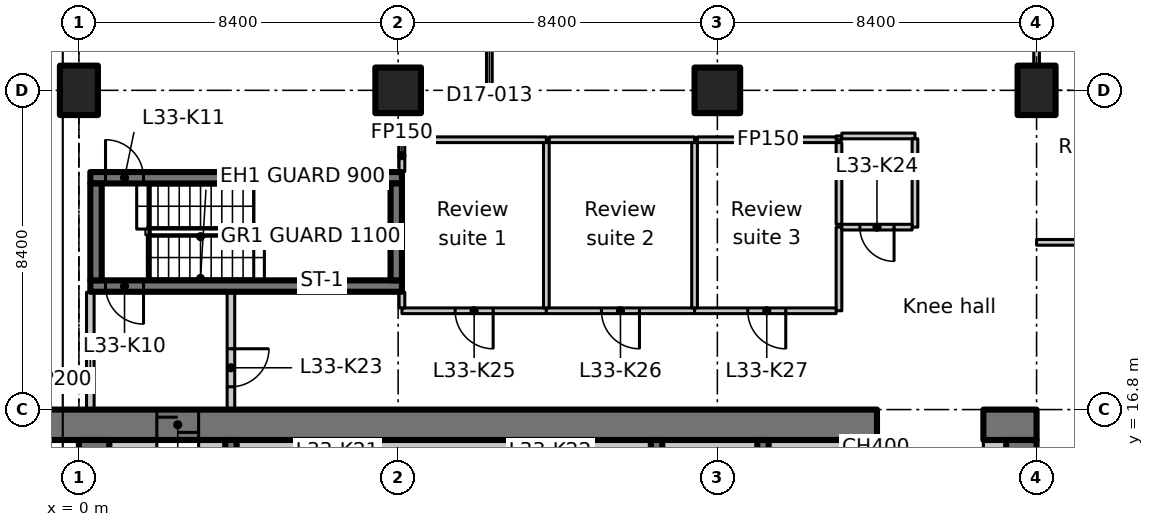
"""IFC4 building model, lengths in metres.
Left out: names, types, materials, properties, quantities, classifications, styles, units other than length and angle.
Written with IfcOpenShell. Run it as: python <this file> out.ifc"""

import sys

from ifc_helpers import new_model, si_unit, direction, frame, frame_2d, origin, origin_2d, place, context, subcontext, project, spatial, polyline, rectangle, outline, extrude, element, fill, save


model = new_model("IFC4")
c1 = context("Model", 3, precision=1e-05, world=origin(), true_north=direction((0.0, 1.0)))
c2 = subcontext(c1, "Body", "Model", "MODEL_VIEW")
j1 = project(units=[si_unit("LENGTHUNIT", "METRE"), si_unit("PLANEANGLEUNIT", "RADIAN")], contexts=[c1])
p1 = place(None, origin())
s1 = spatial("IfcSite", under=j1, at=p1, CompositionType="ELEMENT")
p2 = place(p1, origin())
s2 = spatial("IfcBuilding", under=s1, at=p2, CompositionType="ELEMENT")
p3 = place(p2, frame((0.0, 0.0, 134.9)))
s3 = spatial("IfcBuildingStorey", under=s2, at=p3, CompositionType="ELEMENT", Elevation=134.9)
p4 = place(p3, frame((0.0, 25.2, 0.0), z_axis=(0.0, 0.0, 1.0), x_axis=(1.0, 0.0, 0.0)))
e1 = element("IfcColumn", 1, at=p4, inside=s3, PredefinedType="COLUMN", context=c2, shape_type="SweptSolid", body=[
    extrude(rectangle(XDim=1.0, YDim=1.3, at=origin_2d()), origin(), (0.0, 0.0, 1.0), 3.35),
])
for number, where, z_axis, x_axis in (
    (2, (8.4, 25.2, 0.0), (0.0, 0.0, 1.0), (1.0, 0.0, 0.0)),
    (3, (16.8, 25.2, 0.0), (0.0, 0.0, 1.0), (1.0, 0.0, 0.0)),
):
    element("IfcColumn", number, at=place(p3, frame(where, z_axis=z_axis, x_axis=x_axis)), inside=s3, PredefinedType="COLUMN", context=c2, shape_type="SweptSolid", body=[
        extrude(rectangle(XDim=1.2, YDim=1.2, at=origin_2d()), origin(), (0.0, 0.0, 1.0), 3.35),
    ])
p5 = place(p3, frame((25.2, 25.2, 0.0), z_axis=(0.0, 0.0, 1.0), x_axis=(1.0, 0.0, 0.0)))
e4 = element("IfcColumn", 4, at=p5, inside=s3, PredefinedType="COLUMN", context=c2, shape_type="SweptSolid", body=[
    extrude(rectangle(XDim=1.0, YDim=1.3, at=origin_2d()), origin(), (0.0, 0.0, 1.0), 3.35),
])
p6 = place(p3, frame((-1.1, 16.4, 0.0), z_axis=(0.0, 0.0, 1.0), x_axis=(1.0, 0.0, 0.0)))
e5 = element("IfcWall", 5, at=p6, inside=s3, PredefinedType="SHEAR", context=c2, shape_type="SweptSolid", body=[
    extrude(rectangle(XDim=22.1, YDim=0.8, at=frame_2d((11.05, 0.0))), origin(), (0.0, 0.0, 1.0), 3.35),
])
p7 = place(p6, frame((3.15, 0.0, 0.0)))
e6 = element("IfcOpeningElement", 6, at=p7, cuts=e5, PredefinedType="OPENING", context=c2, shape_type="SweptSolid", body=[
    extrude(rectangle(XDim=1.1, YDim=2.3, at=frame_2d((0.55, 1.15))), frame((0.0, 0.41, 0.0), z_axis=(0.0, -1.0, 0.0), x_axis=(1.0, 0.0, 0.0)), (0.0, 0.0, 1.0), 0.82),
])
p8 = place(p3, frame((23.8, 16.4, 0.0), z_axis=(0.0, 0.0, 1.0), x_axis=(1.0, 0.0, 0.0)))
e7 = element("IfcWall", 7, at=p8, inside=s3, PredefinedType="SHEAR", context=c2, shape_type="SweptSolid", body=[
    extrude(rectangle(XDim=1.4, YDim=0.8, at=frame_2d((0.7, 0.0))), origin(), (0.0, 0.0, 1.0), 3.35),
])
p9 = place(p3, frame((0.4, 7.136, 0.0), z_axis=(0.0, 0.0, 1.0), x_axis=(0.0, 1.0, 0.0)))
e8 = element("IfcWall", 8, at=p9, inside=s3, PredefinedType="SHEAR", context=c2, shape_type="SweptSolid", body=[
    extrude(rectangle(XDim=8.864, YDim=0.8, at=frame_2d((4.432, 0.0))), origin(), (0.0, 0.0, 1.0), 3.35),
])
p10 = place(p3, frame((24.8, 12.6, 0.0), z_axis=(0.0, 0.0, 1.0), x_axis=(0.0, 1.0, 0.0)))
e9 = element("IfcWall", 9, at=p10, inside=s3, PredefinedType="SHEAR", context=c2, shape_type="SweptSolid", body=[
    extrude(rectangle(XDim=3.4, YDim=0.8, at=frame_2d((1.7, 0.0))), origin(), (0.0, 0.0, 1.0), 3.35),
])
p11 = place(p3, frame((0.8, 15.8, 0.0), z_axis=(0.0, 0.0, 1.0), x_axis=(1.0, 0.0, 0.0)))
e10 = element("IfcWall", 10, at=p11, inside=s3, PredefinedType="PARTITIONING", context=c2, shape_type="SweptSolid", body=[
    extrude(rectangle(XDim=1.25, YDim=0.4, at=frame_2d((0.625, 0.0))), origin(), (0.0, 0.0, 1.0), 3.35),
])
p12 = place(p3, frame((23.8, 15.8, 0.0), z_axis=(0.0, 0.0, 1.0), x_axis=(1.0, 0.0, 0.0)))
e11 = element("IfcWall", 11, at=p12, inside=s3, PredefinedType="PARTITIONING", context=c2, shape_type="SweptSolid", body=[
    extrude(rectangle(XDim=0.6, YDim=0.4, at=frame_2d((0.3, 0.0))), origin(), (0.0, 0.0, 1.0), 3.35),
])
for number, where, z_axis, x_axis in (
    (12, (4.0, 12.95, 0.0), (0.0, 0.0, 1.0), (0.0, 1.0, 0.0)),
    (13, (15.2, 12.95, 0.0), (0.0, 0.0, 1.0), (0.0, 1.0, 0.0)),
    (14, (18.0, 12.95, 0.0), (0.0, 0.0, 1.0), (0.0, 1.0, 0.0)),
    (15, (20.8, 12.95, 0.0), (0.0, 0.0, 1.0), (0.0, 1.0, 0.0)),
):
    element("IfcWall", number, at=place(p3, frame(where, z_axis=z_axis, x_axis=x_axis)), inside=s3, PredefinedType="SHEAR", context=c2, shape_type="SweptSolid", body=[
        extrude(rectangle(XDim=3.05, YDim=0.3, at=frame_2d((1.525, 0.0))), origin(), (0.0, 0.0, 1.0), 3.35),
    ])
p13 = place(p3, frame((8.5, 20.05, 0.0), z_axis=(0.0, 0.0, 1.0), x_axis=(-1.0, 0.0, 0.0)))
e16 = element("IfcWall", 16, at=p13, inside=s3, PredefinedType="SHEAR", context=c2, shape_type="SweptSolid", body=[
    extrude(rectangle(XDim=8.2, YDim=0.3, at=frame_2d((4.1, 0.0))), origin(), (0.0, 0.0, 1.0), 3.35),
])
p14 = place(p13, frame((6.8, 0.0, 0.0)))
e17 = element("IfcOpeningElement", 17, at=p14, cuts=e16, PredefinedType="OPENING", context=c2, shape_type="SweptSolid", body=[
    extrude(rectangle(XDim=1.0, YDim=2.1, at=frame_2d((0.5, 1.05))), frame((0.0, 0.16, 0.0), z_axis=(0.0, -1.0, 0.0), x_axis=(1.0, 0.0, 0.0)), (0.0, 0.0, 1.0), 0.32),
])
p15 = place(p3, frame((0.3, 22.9, 0.0), z_axis=(0.0, 0.0, 1.0), x_axis=(1.0, 0.0, 0.0)))
e18 = element("IfcWall", 18, at=p15, inside=s3, PredefinedType="SHEAR", context=c2, shape_type="SweptSolid", body=[
    extrude(rectangle(XDim=8.2, YDim=0.3, at=frame_2d((4.1, 0.0))), origin(), (0.0, 0.0, 1.0), 3.35),
])
p16 = place(p15, frame((0.4, 0.0, 0.0)))
e19 = element("IfcOpeningElement", 19, at=p16, cuts=e18, PredefinedType="OPENING", context=c2, shape_type="SweptSolid", body=[
    extrude(rectangle(XDim=1.0, YDim=2.1, at=frame_2d((0.5, 1.05))), frame((0.0, 0.16, 0.0), z_axis=(0.0, -1.0, 0.0), x_axis=(1.0, 0.0, 0.0)), (0.0, 0.0, 1.0), 0.32),
])
for number, where, z_axis, x_axis in (
    (20, (0.45, 20.2, 0.0), (0.0, 0.0, 1.0), (0.0, 1.0, 0.0)),
    (21, (8.35, 20.2, 0.0), (0.0, 0.0, 1.0), (0.0, 1.0, 0.0)),
):
    element("IfcWall", number, at=place(p3, frame(where, z_axis=z_axis, x_axis=x_axis)), inside=s3, PredefinedType="SHEAR", context=c2, shape_type="SweptSolid", body=[
        extrude(rectangle(XDim=2.55, YDim=0.3, at=frame_2d((1.275, 0.0))), origin(), (0.0, 0.0, 1.0), 3.35),
    ])
p17 = place(p3, frame((0.3, 16.812, 0.0), z_axis=(0.0, 0.0, 1.0), x_axis=(0.0, 1.0, 0.0)))
e22 = element("IfcWall", 22, at=p17, inside=s3, PredefinedType="PARTITIONING", context=c2, shape_type="SweptSolid", body=[
    extrude(rectangle(XDim=3.076, YDim=0.2, at=frame_2d((1.538, 0.0))), origin(), (0.0, 0.0, 1.0), 2.98),
])
p18 = place(p3, frame((4.0, 19.888, 0.0), z_axis=(0.0, 0.0, 1.0), x_axis=(0.0, -1.0, 0.0)))
e23 = element("IfcWall", 23, at=p18, inside=s3, PredefinedType="PARTITIONING", context=c2, shape_type="SweptSolid", body=[
    extrude(rectangle(XDim=3.076, YDim=0.2, at=frame_2d((1.538, 0.0))), origin(), (0.0, 0.0, 1.0), 3.35),
])
p19 = place(p18, frame((1.488, 0.0, 0.0)))
e24 = element("IfcOpeningElement", 24, at=p19, cuts=e23, PredefinedType="OPENING", context=c2, shape_type="SweptSolid", body=[
    extrude(rectangle(XDim=1.0, YDim=2.1, at=frame_2d((0.5, 1.05))), frame((0.0, 0.11, 0.0), z_axis=(0.0, -1.0, 0.0), x_axis=(1.0, 0.0, 0.0)), (0.0, 0.0, 1.0), 0.22),
])
p20 = place(p3, frame((12.3, 19.4, 0.0), z_axis=(0.0, 0.0, 1.0), x_axis=(-1.0, 0.0, 0.0)))
e25 = element("IfcWall", 25, at=p20, inside=s3, PredefinedType="PARTITIONING", context=c2, shape_type="SweptSolid", body=[
    extrude(rectangle(XDim=3.8, YDim=0.15, at=frame_2d((1.9, 0.0))), origin(), (0.0, 0.0, 1.0), 3.35),
])
p21 = place(p20, frame((1.4, 0.0, 0.0)))
e26 = element("IfcOpeningElement", 26, at=p21, cuts=e25, PredefinedType="OPENING", context=c2, shape_type="SweptSolid", body=[
    extrude(rectangle(XDim=1.0, YDim=2.1, at=frame_2d((0.5, 1.05))), frame((0.0, 0.085, 0.0), z_axis=(0.0, -1.0, 0.0), x_axis=(1.0, 0.0, 0.0)), (0.0, 0.0, 1.0), 0.17),
])
p22 = place(p3, frame((8.5, 19.475, 0.0), z_axis=(0.0, 0.0, 1.0), x_axis=(0.0, 1.0, 0.0)))
e27 = element("IfcWall", 27, at=p22, inside=s3, PredefinedType="PARTITIONING", context=c2, shape_type="SweptSolid", body=[
    extrude(rectangle(XDim=0.413, YDim=0.15, at=frame_2d((0.207, 0.0))), origin(), (0.0, 0.0, 1.0), 3.35),
])
p23 = place(p3, frame((8.5, 23.062, 0.0), z_axis=(0.0, 0.0, 1.0), x_axis=(0.0, 1.0, 0.0)))
e28 = element("IfcWall", 28, at=p23, inside=s3, PredefinedType="PARTITIONING", context=c2, shape_type="SweptSolid", body=[
    extrude(rectangle(XDim=0.838, YDim=0.15, at=frame_2d((0.419, 0.0))), origin(), (0.0, 0.0, 1.0), 3.35),
])
p24 = place(p3, frame((8.575, 23.9, 0.0), z_axis=(0.0, 0.0, 1.0), x_axis=(1.0, 0.0, 0.0)))
e29 = element("IfcWall", 29, at=p24, inside=s3, PredefinedType="PARTITIONING", context=c2, shape_type="SweptSolid", body=[
    extrude(rectangle(XDim=3.725, YDim=0.15, at=frame_2d((1.863, 0.0))), origin(), (0.0, 0.0, 1.0), 3.35),
])
p25 = place(p3, frame((16.2, 19.4, 0.0), z_axis=(0.0, 0.0, 1.0), x_axis=(-1.0, 0.0, 0.0)))
e30 = element("IfcWall", 30, at=p25, inside=s3, PredefinedType="PARTITIONING", context=c2, shape_type="SweptSolid", body=[
    extrude(rectangle(XDim=3.9, YDim=0.15, at=frame_2d((1.95, 0.0))), origin(), (0.0, 0.0, 1.0), 3.35),
])
p26 = place(p25, frame((1.45, 0.0, 0.0)))
e31 = element("IfcOpeningElement", 31, at=p26, cuts=e30, PredefinedType="OPENING", context=c2, shape_type="SweptSolid", body=[
    extrude(rectangle(XDim=1.0, YDim=2.1, at=frame_2d((0.5, 1.05))), frame((0.0, 0.085, 0.0), z_axis=(0.0, -1.0, 0.0), x_axis=(1.0, 0.0, 0.0)), (0.0, 0.0, 1.0), 0.17),
])
p27 = place(p3, frame((12.3, 23.825, 0.0), z_axis=(0.0, 0.0, 1.0), x_axis=(0.0, -1.0, 0.0)))
e32 = element("IfcWall", 32, at=p27, inside=s3, PredefinedType="PARTITIONING", context=c2, shape_type="SweptSolid", body=[
    extrude(rectangle(XDim=4.35, YDim=0.15, at=frame_2d((2.175, 0.0))), origin(), (0.0, 0.0, 1.0), 3.35),
])
p28 = place(p3, frame((12.375, 23.9, 0.0), z_axis=(0.0, 0.0, 1.0), x_axis=(1.0, 0.0, 0.0)))
e33 = element("IfcWall", 33, at=p28, inside=s3, PredefinedType="PARTITIONING", context=c2, shape_type="SweptSolid", body=[
    extrude(rectangle(XDim=3.825, YDim=0.15, at=frame_2d((1.913, 0.0))), origin(), (0.0, 0.0, 1.0), 3.35),
])
p29 = place(p3, frame((20.0, 21.6, 0.0), z_axis=(0.0, 0.0, 1.0), x_axis=(0.0, -1.0, 0.0)))
e34 = element("IfcWall", 34, at=p29, inside=s3, PredefinedType="PARTITIONING", context=c2, shape_type="SweptSolid", body=[
    extrude(rectangle(XDim=2.2, YDim=0.15, at=frame_2d((1.1, 0.0))), origin(), (0.0, 0.0, 1.0), 3.35),
])
p30 = place(p3, frame((19.925, 19.4, 0.0), z_axis=(0.0, 0.0, 1.0), x_axis=(-1.0, 0.0, 0.0)))
e35 = element("IfcWall", 35, at=p30, inside=s3, PredefinedType="PARTITIONING", context=c2, shape_type="SweptSolid", body=[
    extrude(rectangle(XDim=3.725, YDim=0.15, at=frame_2d((1.863, 0.0))), origin(), (0.0, 0.0, 1.0), 3.35),
])
p31 = place(p30, frame((1.325, 0.0, 0.0)))
e36 = element("IfcOpeningElement", 36, at=p31, cuts=e35, PredefinedType="OPENING", context=c2, shape_type="SweptSolid", body=[
    extrude(rectangle(XDim=1.0, YDim=2.1, at=frame_2d((0.5, 1.05))), frame((0.0, 0.085, 0.0), z_axis=(0.0, -1.0, 0.0), x_axis=(1.0, 0.0, 0.0)), (0.0, 0.0, 1.0), 0.17),
])
p32 = place(p3, frame((16.2, 23.825, 0.0), z_axis=(0.0, 0.0, 1.0), x_axis=(0.0, -1.0, 0.0)))
e37 = element("IfcWall", 37, at=p32, inside=s3, PredefinedType="PARTITIONING", context=c2, shape_type="SweptSolid", body=[
    extrude(rectangle(XDim=4.35, YDim=0.15, at=frame_2d((2.175, 0.0))), origin(), (0.0, 0.0, 1.0), 3.35),
])
p33 = place(p3, frame((16.275, 23.9, 0.0), z_axis=(0.0, 0.0, 1.0), x_axis=(1.0, 0.0, 0.0)))
e38 = element("IfcWall", 38, at=p33, inside=s3, PredefinedType="PARTITIONING", context=c2, shape_type="SweptSolid", body=[
    extrude(rectangle(XDim=3.725, YDim=0.15, at=frame_2d((1.863, 0.0))), origin(), (0.0, 0.0, 1.0), 3.35),
])
p34 = place(p3, frame((20.0, 23.9, 0.0), z_axis=(0.0, 0.0, 1.0), x_axis=(0.0, 1.0, 0.0)))
e39 = element("IfcWall", 39, at=p34, inside=s3, PredefinedType="PARTITIONING", context=c2, shape_type="SweptSolid", body=[
    extrude(rectangle(XDim=0.1, YDim=0.15, at=frame_2d((0.05, 0.0))), origin(), (0.0, 0.0, 1.0), 3.35),
])
p35 = place(p3, frame((20.075, 24.0, 0.0), z_axis=(0.0, 0.0, 1.0), x_axis=(1.0, 0.0, 0.0)))
e40 = element("IfcWall", 40, at=p35, inside=s3, PredefinedType="PARTITIONING", context=c2, shape_type="SweptSolid", body=[
    extrude(rectangle(XDim=1.925, YDim=0.15, at=frame_2d((0.962, 0.0))), origin(), (0.0, 0.0, 1.0), 3.35),
])
p36 = place(p3, frame((22.0, 23.925, 0.0), z_axis=(0.0, 0.0, 1.0), x_axis=(0.0, -1.0, 0.0)))
e41 = element("IfcWall", 41, at=p36, inside=s3, PredefinedType="PARTITIONING", context=c2, shape_type="SweptSolid", body=[
    extrude(rectangle(XDim=2.325, YDim=0.15, at=frame_2d((1.163, 0.0))), origin(), (0.0, 0.0, 1.0), 3.35),
])
p37 = place(p3, frame((21.925, 21.6, 0.0), z_axis=(0.0, 0.0, 1.0), x_axis=(-1.0, 0.0, 0.0)))
e42 = element("IfcWall", 42, at=p37, inside=s3, PredefinedType="PARTITIONING", context=c2, shape_type="SweptSolid", body=[
    extrude(rectangle(XDim=1.85, YDim=0.15, at=frame_2d((0.925, 0.0))), origin(), (0.0, 0.0, 1.0), 3.35),
])
p38 = place(p37, frame((0.475, 0.0, 0.0)))
e43 = element("IfcOpeningElement", 43, at=p38, cuts=e42, PredefinedType="OPENING", context=c2, shape_type="SweptSolid", body=[
    extrude(rectangle(XDim=0.9, YDim=2.1, at=frame_2d((0.45, 1.05))), frame((0.0, 0.085, 0.0), z_axis=(0.0, -1.0, 0.0), x_axis=(1.0, 0.0, 0.0)), (0.0, 0.0, 1.0), 0.17),
])
p39 = place(p3, frame((20.0, 21.675, 0.0), z_axis=(0.0, 0.0, 1.0), x_axis=(0.0, 1.0, 0.0)))
e44 = element("IfcWall", 44, at=p39, inside=s3, PredefinedType="PARTITIONING", context=c2, shape_type="SweptSolid", body=[
    extrude(rectangle(XDim=2.15, YDim=0.15, at=frame_2d((1.075, 0.0))), origin(), (0.0, 0.0, 1.0), 3.35),
])
p40 = place(p3, frame((3.15, 15.8, 0.0), z_axis=(0.0, 0.0, 1.0), x_axis=(1.0, 0.0, 0.0)))
e45 = element("IfcWall", 45, at=p40, inside=s3, PredefinedType="PARTITIONING", context=c2, shape_type="SweptSolid", body=[
    extrude(rectangle(XDim=0.7, YDim=0.4, at=frame_2d((0.35, 0.0))), origin(), (0.0, 0.0, 1.0), 3.35),
])
p41 = place(p3, frame((4.15, 15.8, 0.0), z_axis=(0.0, 0.0, 1.0), x_axis=(1.0, 0.0, 0.0)))
e46 = element("IfcWall", 46, at=p41, inside=s3, PredefinedType="PARTITIONING", context=c2, shape_type="SweptSolid", body=[
    extrude(rectangle(XDim=10.9, YDim=0.4, at=frame_2d((5.45, 0.0))), origin(), (0.0, 0.0, 1.0), 3.35),
])
for number, where, z_axis, x_axis in (
    (47, (15.35, 15.8, 0.0), (0.0, 0.0, 1.0), (1.0, 0.0, 0.0)),
    (48, (18.15, 15.8, 0.0), (0.0, 0.0, 1.0), (1.0, 0.0, 0.0)),
):
    element("IfcWall", number, at=place(p3, frame(where, z_axis=z_axis, x_axis=x_axis)), inside=s3, PredefinedType="PARTITIONING", context=c2, shape_type="SweptSolid", body=[
        extrude(rectangle(XDim=2.5, YDim=0.4, at=frame_2d((1.25, 0.0))), origin(), (0.0, 0.0, 1.0), 3.35),
    ])
p42 = place(p3, frame((20.95, 15.8, 0.0), z_axis=(0.0, 0.0, 1.0), x_axis=(1.0, 0.0, 0.0)))
e49 = element("IfcWall", 49, at=p42, inside=s3, PredefinedType="PARTITIONING", context=c2, shape_type="SweptSolid", body=[
    extrude(rectangle(XDim=0.05, YDim=0.4, at=frame_2d((0.025, 0.0))), origin(), (0.0, 0.0, 1.0), 3.35),
])
p43 = place(p3, frame((25.2, 21.2, 0.0), z_axis=(0.0, 0.0, 1.0), x_axis=(1.0, 0.0, 0.0)))
e50 = element("IfcWall", 50, at=p43, inside=s3, PredefinedType="PARTITIONING", context=c2, shape_type="SweptSolid", body=[
    extrude(rectangle(XDim=4.2, YDim=0.15, at=frame_2d((2.1, 0.0))), origin(), (0.0, 0.0, 1.0), 3.33),
])
p44 = place(p3, frame((25.2, 31.0, 0.0), z_axis=(0.0, 0.0, 1.0), x_axis=(0.0, -1.0, 0.0)))
e51 = element("IfcWall", 51, at=p44, inside=s3, PredefinedType="PARTITIONING", context=c2, shape_type="SweptSolid", body=[
    extrude(outline(polyline([(0.0, 0.0), (5.13, 0.0), (5.13, 2.98), (0.0, 2.98), (0.0, 0.0)])), frame((0.0, 0.075, 0.0), z_axis=(0.0, -1.0, 0.0), x_axis=(1.0, 0.0, 0.0)), (0.0, 0.0, 1.0), 0.15),
])
p45 = place(p44, frame((1.93, 0.0, 0.0)))
e52 = element("IfcOpeningElement", 52, at=p45, cuts=e51, PredefinedType="OPENING", context=c2, shape_type="SweptSolid", body=[
    extrude(rectangle(XDim=1.1, YDim=2.1, at=frame_2d((0.55, 1.05))), frame((0.0, 0.085, 0.0), z_axis=(0.0, -1.0, 0.0), x_axis=(1.0, 0.0, 0.0)), (0.0, 0.0, 1.0), 0.17),
])
p46 = place(p3, frame((10.8, 25.2, 0.0), z_axis=(0.0, 0.0, 1.0), x_axis=(0.0, 1.0, 0.0)))
e53 = element("IfcWall", 53, at=p46, inside=s3, PredefinedType="PARTITIONING", context=c2, shape_type="SweptSolid", body=[
    extrude(rectangle(XDim=4.2, YDim=0.15, at=frame_2d((2.1, 0.0))), origin(), (0.0, 0.0, 1.0), 3.33),
])
p47 = place(p46, frame((1.5, 0.0, 0.0)))
e54 = element("IfcOpeningElement", 54, at=p47, cuts=e53, PredefinedType="OPENING", context=c2, shape_type="SweptSolid", body=[
    extrude(rectangle(XDim=1.1, YDim=2.1, at=frame_2d((0.55, 1.05))), frame((0.0, 0.085, 0.0), z_axis=(0.0, -1.0, 0.0), x_axis=(1.0, 0.0, 0.0)), (0.0, 0.0, 1.0), 0.17),
])
p48 = place(p7, origin())
e55 = element("IfcDoor", 55, at=p48, inside=s3, OperationType="SLIDING_TO_LEFT", PredefinedType="DOOR", context=c2, shape_type="SweptSolid", body=[
    extrude(rectangle(XDim=1.1, YDim=2.3, at=frame_2d((0.55, 1.15))), frame((0.0, 0.025, 0.0), z_axis=(0.0, -1.0, 0.0), x_axis=(1.0, 0.0, 0.0)), (0.0, 0.0, 1.0), 0.05),
])
fill(e6, e55)
p49 = place(p14, origin())
e56 = element("IfcDoor", 56, at=p49, inside=s3, OperationType="SINGLE_SWING_RIGHT", PredefinedType="DOOR", context=c2, shape_type="SweptSolid", body=[
    extrude(rectangle(XDim=1.0, YDim=2.1, at=frame_2d((0.5, 1.05))), frame((0.0, 0.025, 0.0), z_axis=(0.0, -1.0, 0.0), x_axis=(1.0, 0.0, 0.0)), (0.0, 0.0, 1.0), 0.05),
])
fill(e17, e56)
p50 = place(p16, origin())
e57 = element("IfcDoor", 57, at=p50, inside=s3, OperationType="SINGLE_SWING_LEFT", PredefinedType="DOOR", context=c2, shape_type="SweptSolid", body=[
    extrude(rectangle(XDim=1.0, YDim=2.1, at=frame_2d((0.5, 1.05))), frame((0.0, 0.025, 0.0), z_axis=(0.0, -1.0, 0.0), x_axis=(1.0, 0.0, 0.0)), (0.0, 0.0, 1.0), 0.05),
])
fill(e19, e57)
p51 = place(p19, origin())
e58 = element("IfcDoor", 58, at=p51, inside=s3, OperationType="SINGLE_SWING_LEFT", PredefinedType="DOOR", context=c2, shape_type="SweptSolid", body=[
    extrude(rectangle(XDim=1.0, YDim=2.1, at=frame_2d((0.5, 1.05))), frame((0.0, 0.025, 0.0), z_axis=(0.0, -1.0, 0.0), x_axis=(1.0, 0.0, 0.0)), (0.0, 0.0, 1.0), 0.05),
])
fill(e24, e58)
p52 = place(p38, origin())
e59 = element("IfcDoor", 59, at=p52, inside=s3, OperationType="SINGLE_SWING_RIGHT", PredefinedType="DOOR", context=c2, shape_type="SweptSolid", body=[
    extrude(rectangle(XDim=0.9, YDim=2.1, at=frame_2d((0.45, 1.05))), frame((0.0, 0.025, 0.0), z_axis=(0.0, -1.0, 0.0), x_axis=(1.0, 0.0, 0.0)), (0.0, 0.0, 1.0), 0.05),
])
fill(e43, e59)
p53 = place(p21, origin())
e60 = element("IfcDoor", 60, at=p53, inside=s3, OperationType="SINGLE_SWING_LEFT", PredefinedType="DOOR", context=c2, shape_type="SweptSolid", body=[
    extrude(rectangle(XDim=1.0, YDim=2.1, at=frame_2d((0.5, 1.05))), frame((0.0, 0.025, 0.0), z_axis=(0.0, -1.0, 0.0), x_axis=(1.0, 0.0, 0.0)), (0.0, 0.0, 1.0), 0.05),
])
fill(e26, e60)
p54 = place(p26, origin())
e61 = element("IfcDoor", 61, at=p54, inside=s3, OperationType="SINGLE_SWING_RIGHT", PredefinedType="DOOR", context=c2, shape_type="SweptSolid", body=[
    extrude(rectangle(XDim=1.0, YDim=2.1, at=frame_2d((0.5, 1.05))), frame((0.0, 0.025, 0.0), z_axis=(0.0, -1.0, 0.0), x_axis=(1.0, 0.0, 0.0)), (0.0, 0.0, 1.0), 0.05),
])
fill(e31, e61)
p55 = place(p31, origin())
e62 = element("IfcDoor", 62, at=p55, inside=s3, OperationType="SINGLE_SWING_LEFT", PredefinedType="DOOR", context=c2, shape_type="SweptSolid", body=[
    extrude(rectangle(XDim=1.0, YDim=2.1, at=frame_2d((0.5, 1.05))), frame((0.0, 0.025, 0.0), z_axis=(0.0, -1.0, 0.0), x_axis=(1.0, 0.0, 0.0)), (0.0, 0.0, 1.0), 0.05),
])
fill(e36, e62)
save(model, sys.argv[1])
